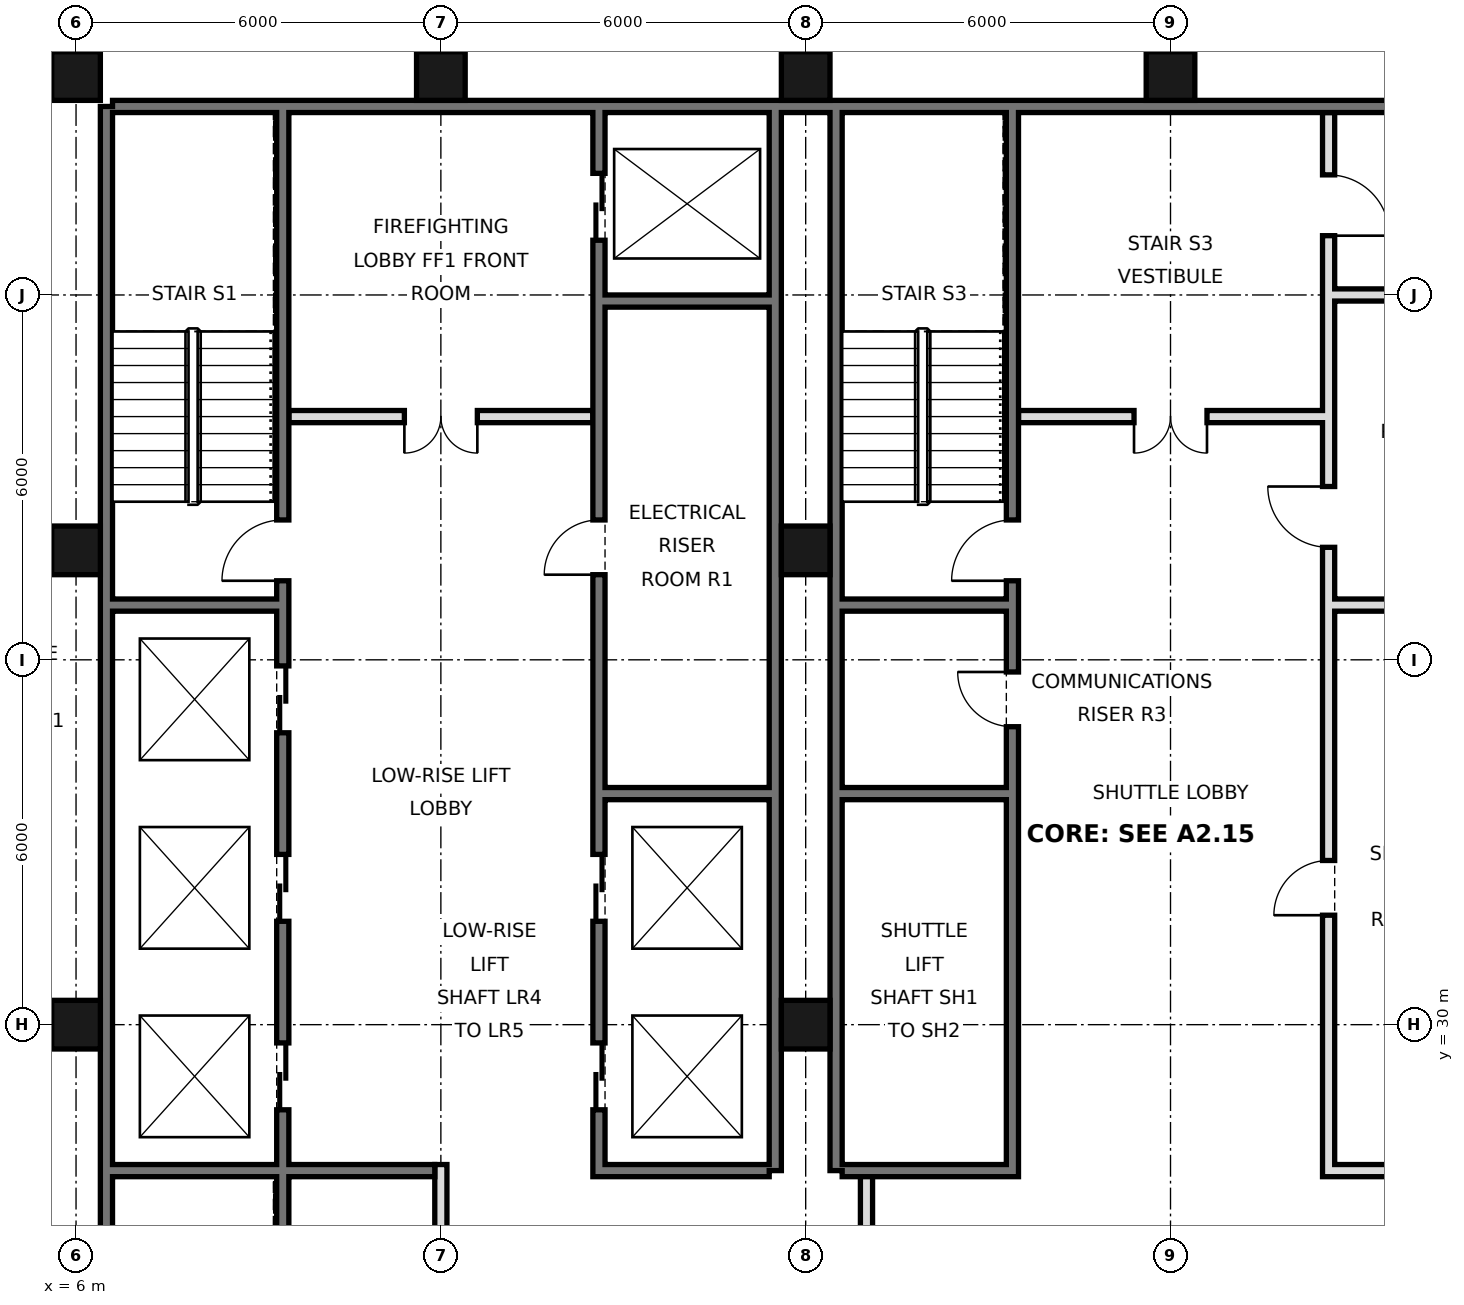
"""IFC4 building model, lengths in metres.
Left out: names, types, materials, properties, quantities, classifications, styles, units other than length and angle.
Written with IfcOpenShell. Run it as: python <this file> out.ifc"""

import sys

from ifc_helpers import new_model, si_unit, direction, frame, frame_2d, origin, origin_2d, place, context, subcontext, project, spatial, rectangle, hollow_rectangle, extrude, element, fill, save


model = new_model("IFC4")
c1 = context("Model", 3, precision=1e-05, world=origin(), true_north=direction((0.0, 1.0)))
c2 = subcontext(c1, "Body", "Model", "MODEL_VIEW")
j1 = project(units=[si_unit("LENGTHUNIT", "METRE"), si_unit("PLANEANGLEUNIT", "RADIAN")], contexts=[c1])
p1 = place(None, origin())
s1 = spatial("IfcSite", under=j1, at=p1, CompositionType="ELEMENT")
p2 = place(p1, origin())
s2 = spatial("IfcBuilding", under=s1, at=p2, CompositionType="ELEMENT")
p3 = place(p2, frame((0.0, 0.0, 60.6)))
s3 = spatial("IfcBuildingStorey", under=s2, at=p3, CompositionType="ELEMENT", Elevation=60.6)
for number, where, z_axis, x_axis in (
    (1, (6.0, 30.0, 0.0), (0.0, 0.0, 1.0), (1.0, 0.0, 0.0)),
    (2, (6.0, 37.8, 0.0), (0.0, 0.0, 1.0), (1.0, 0.0, 0.0)),
    (3, (6.0, 45.6, 0.0), (0.0, 0.0, 1.0), (1.0, 0.0, 0.0)),
    (4, (12.0, 45.6, 0.0), (0.0, 0.0, 1.0), (1.0, 0.0, 0.0)),
    (5, (18.0, 30.0, 0.0), (0.0, 0.0, 1.0), (1.0, 0.0, 0.0)),
    (6, (18.0, 37.8, 0.0), (0.0, 0.0, 1.0), (1.0, 0.0, 0.0)),
    (7, (18.0, 45.6, 0.0), (0.0, 0.0, 1.0), (1.0, 0.0, 0.0)),
    (8, (24.0, 45.6, 0.0), (0.0, 0.0, 1.0), (1.0, 0.0, 0.0)),
):
    element("IfcColumn", number, at=place(p3, frame(where, z_axis=z_axis, x_axis=x_axis)), inside=s3, PredefinedType="COLUMN", context=c2, shape_type="SweptSolid", body=[
        extrude(hollow_rectangle(XDim=0.8, YDim=0.8, WallThickness=0.06, at=origin_2d()), origin(), (0.0, 0.0, 1.0), 3.6),
    ])
p4 = place(p3, frame((6.5, 21.6, 0.0), z_axis=(0.0, 0.0, 1.0), x_axis=(0.0, 1.0, 0.0)))
e9 = element("IfcWall", 9, at=p4, inside=s3, PredefinedType="SOLIDWALL", context=c2, shape_type="SweptSolid", body=[
    extrude(rectangle(XDim=23.5, YDim=0.2, at=frame_2d((11.75, 0.0))), origin(), (0.0, 0.0, 1.0), 3.42),
])
p5 = place(p3, frame((6.6, 45.1, 0.0), z_axis=(0.0, 0.0, 1.0), x_axis=(1.0, 0.0, 0.0)))
e10 = element("IfcWall", 10, at=p5, inside=s3, PredefinedType="SOLIDWALL", context=c2, shape_type="SweptSolid", body=[
    extrude(rectangle(XDim=34.8, YDim=0.2, at=frame_2d((17.4, 0.0))), origin(), (0.0, 0.0, 1.0), 3.42),
])
for number, where, z_axis, x_axis in (
    (11, (17.5, 27.6, 0.0), (0.0, 0.0, 1.0), (0.0, 1.0, 0.0)),
    (12, (18.5, 27.6, 0.0), (0.0, 0.0, 1.0), (0.0, 1.0, 0.0)),
):
    element("IfcWall", number, at=place(p3, frame(where, z_axis=z_axis, x_axis=x_axis)), inside=s3, PredefinedType="SOLIDWALL", context=c2, shape_type="SweptSolid", body=[
        extrude(rectangle(XDim=17.5, YDim=0.2, at=frame_2d((8.75, 0.0))), origin(), (0.0, 0.0, 1.0), 3.42),
    ])
p6 = place(p3, frame((19.0, 21.6, 0.0), z_axis=(0.0, 0.0, 1.0), x_axis=(0.0, 1.0, 0.0)))
e13 = element("IfcWall", 13, at=p6, inside=s3, PredefinedType="PARTITIONING", context=c2, shape_type="SweptSolid", body=[
    extrude(rectangle(XDim=6.0, YDim=0.2, at=frame_2d((3.0, 0.0))), origin(), (0.0, 0.0, 1.0), 3.42),
])
p7 = place(p6, frame((2.1, 0.0, 0.0)))
e14 = element("IfcOpeningElement", 14, at=p7, cuts=e13, PredefinedType="OPENING", context=c2, shape_type="SweptSolid", body=[
    extrude(rectangle(XDim=1.8, YDim=2.1, at=frame_2d((0.9, 1.05))), frame((0.0, 0.11, 0.0), z_axis=(0.0, -1.0, 0.0), x_axis=(1.0, 0.0, 0.0)), (0.0, 0.0, 1.0), 0.22),
])
p8 = place(p3, frame((12.0, 21.6, 0.0), z_axis=(0.0, 0.0, 1.0), x_axis=(0.0, 1.0, 0.0)))
e15 = element("IfcWall", 15, at=p8, inside=s3, PredefinedType="PARTITIONING", context=c2, shape_type="SweptSolid", body=[
    extrude(rectangle(XDim=6.1, YDim=0.2, at=frame_2d((3.05, 0.0))), origin(), (0.0, 0.0, 1.0), 3.42),
])
p9 = place(p3, frame((14.6, 27.5, 0.0), z_axis=(0.0, 0.0, 1.0), x_axis=(0.0, 1.0, 0.0)))
e16 = element("IfcWall", 16, at=p9, inside=s3, PredefinedType="SOLIDWALL", context=c2, shape_type="SweptSolid", body=[
    extrude(rectangle(XDim=17.5, YDim=0.2, at=frame_2d((8.75, 0.0))), origin(), (0.0, 0.0, 1.0), 3.42),
])
p10 = place(p9, frame((1.1, 0.0, 0.0)))
e17 = element("IfcOpeningElement", 17, at=p10, cuts=e16, PredefinedType="OPENING", context=c2, shape_type="SweptSolid", body=[
    extrude(rectangle(XDim=1.1, YDim=2.1, at=frame_2d((0.55, 1.05))), frame((0.0, 0.11, 0.0), z_axis=(0.0, -1.0, 0.0), x_axis=(1.0, 0.0, 0.0)), (0.0, 0.0, 1.0), 0.22),
])
p11 = place(p9, frame((4.2, 0.0, 0.0)))
e18 = element("IfcOpeningElement", 18, at=p11, cuts=e16, PredefinedType="OPENING", context=c2, shape_type="SweptSolid", body=[
    extrude(rectangle(XDim=1.1, YDim=2.1, at=frame_2d((0.55, 1.05))), frame((0.0, 0.11, 0.0), z_axis=(0.0, -1.0, 0.0), x_axis=(1.0, 0.0, 0.0)), (0.0, 0.0, 1.0), 0.22),
])
p12 = place(p9, frame((15.4, 0.0, 0.0)))
e19 = element("IfcOpeningElement", 19, at=p12, cuts=e16, PredefinedType="OPENING", context=c2, shape_type="SweptSolid", body=[
    extrude(rectangle(XDim=1.1, YDim=2.1, at=frame_2d((0.55, 1.05))), frame((0.0, 0.11, 0.0), z_axis=(0.0, -1.0, 0.0), x_axis=(1.0, 0.0, 0.0)), (0.0, 0.0, 1.0), 0.22),
])
p13 = place(p9, frame((9.9, 0.0, 0.0)))
e20 = element("IfcOpeningElement", 20, at=p13, cuts=e16, PredefinedType="OPENING", context=c2, shape_type="SweptSolid", body=[
    extrude(rectangle(XDim=0.9, YDim=2.1, at=frame_2d((0.45, 1.05))), frame((0.0, 0.11, 0.0), z_axis=(0.0, -1.0, 0.0), x_axis=(1.0, 0.0, 0.0)), (0.0, 0.0, 1.0), 0.22),
])
p14 = place(p3, frame((21.4, 27.5, 0.0), z_axis=(0.0, 0.0, 1.0), x_axis=(0.0, 1.0, 0.0)))
e21 = element("IfcWall", 21, at=p14, inside=s3, PredefinedType="SOLIDWALL", context=c2, shape_type="SweptSolid", body=[
    extrude(rectangle(XDim=17.5, YDim=0.2, at=frame_2d((8.75, 0.0))), origin(), (0.0, 0.0, 1.0), 3.42),
])
p15 = place(p14, frame((9.8, 0.0, 0.0)))
e22 = element("IfcOpeningElement", 22, at=p15, cuts=e21, PredefinedType="OPENING", context=c2, shape_type="SweptSolid", body=[
    extrude(rectangle(XDim=1.0, YDim=2.1, at=frame_2d((0.5, 1.05))), frame((0.0, 0.11, 0.0), z_axis=(0.0, -1.0, 0.0), x_axis=(1.0, 0.0, 0.0)), (0.0, 0.0, 1.0), 0.22),
])
p16 = place(p14, frame((7.4, 0.0, 0.0)))
e23 = element("IfcOpeningElement", 23, at=p16, cuts=e21, PredefinedType="OPENING", context=c2, shape_type="SweptSolid", body=[
    extrude(rectangle(XDim=0.9, YDim=2.1, at=frame_2d((0.45, 1.05))), frame((0.0, 0.11, 0.0), z_axis=(0.0, -1.0, 0.0), x_axis=(1.0, 0.0, 0.0)), (0.0, 0.0, 1.0), 0.22),
])
p17 = place(p3, frame((26.6, 27.5, 0.0), z_axis=(0.0, 0.0, 1.0), x_axis=(0.0, 1.0, 0.0)))
e24 = element("IfcWall", 24, at=p17, inside=s3, PredefinedType="SOLIDWALL", context=c2, shape_type="SweptSolid", body=[
    extrude(rectangle(XDim=17.5, YDim=0.2, at=frame_2d((8.75, 0.0))), origin(), (0.0, 0.0, 1.0), 3.42),
])
p18 = place(p17, frame((4.3, 0.0, 0.0)))
e25 = element("IfcOpeningElement", 25, at=p18, cuts=e24, PredefinedType="OPENING", context=c2, shape_type="SweptSolid", body=[
    extrude(rectangle(XDim=0.9, YDim=2.1, at=frame_2d((0.45, 1.05))), frame((0.0, 0.11, 0.0), z_axis=(0.0, -1.0, 0.0), x_axis=(1.0, 0.0, 0.0)), (0.0, 0.0, 1.0), 0.22),
])
p19 = place(p17, frame((10.35, 0.0, 0.0)))
e26 = element("IfcOpeningElement", 26, at=p19, cuts=e24, PredefinedType="OPENING", context=c2, shape_type="SweptSolid", body=[
    extrude(rectangle(XDim=1.0, YDim=2.1, at=frame_2d((0.5, 1.05))), frame((0.0, 0.11, 0.0), z_axis=(0.0, -1.0, 0.0), x_axis=(1.0, 0.0, 0.0)), (0.0, 0.0, 1.0), 0.22),
])
p20 = place(p17, frame((15.475, 0.0, 0.0)))
e27 = element("IfcOpeningElement", 27, at=p20, cuts=e24, PredefinedType="OPENING", context=c2, shape_type="SweptSolid", body=[
    extrude(rectangle(XDim=1.0, YDim=2.1, at=frame_2d((0.5, 1.05))), frame((0.0, 0.11, 0.0), z_axis=(0.0, -1.0, 0.0), x_axis=(1.0, 0.0, 0.0)), (0.0, 0.0, 1.0), 0.22),
])
p21 = place(p3, frame((9.4, 21.6, 0.0), z_axis=(0.0, 0.0, 1.0), x_axis=(0.0, 1.0, 0.0)))
e28 = element("IfcWall", 28, at=p21, inside=s3, PredefinedType="SOLIDWALL", context=c2, shape_type="SweptSolid", body=[
    extrude(rectangle(XDim=23.4, YDim=0.2, at=frame_2d((11.7, 0.0))), origin(), (0.0, 0.0, 1.0), 3.42),
])
p22 = place(p21, frame((7.0, 0.0, 0.0)))
e29 = element("IfcOpeningElement", 29, at=p22, cuts=e28, PredefinedType="OPENING", context=c2, shape_type="SweptSolid", body=[
    extrude(rectangle(XDim=1.1, YDim=2.1, at=frame_2d((0.55, 1.05))), frame((0.0, 0.11, 0.0), z_axis=(0.0, -1.0, 0.0), x_axis=(1.0, 0.0, 0.0)), (0.0, 0.0, 1.0), 0.22),
])
p23 = place(p21, frame((10.1, 0.0, 0.0)))
e30 = element("IfcOpeningElement", 30, at=p23, cuts=e28, PredefinedType="OPENING", context=c2, shape_type="SweptSolid", body=[
    extrude(rectangle(XDim=1.1, YDim=2.1, at=frame_2d((0.55, 1.05))), frame((0.0, 0.11, 0.0), z_axis=(0.0, -1.0, 0.0), x_axis=(1.0, 0.0, 0.0)), (0.0, 0.0, 1.0), 0.22),
])
p24 = place(p21, frame((13.2, 0.0, 0.0)))
e31 = element("IfcOpeningElement", 31, at=p24, cuts=e28, PredefinedType="OPENING", context=c2, shape_type="SweptSolid", body=[
    extrude(rectangle(XDim=1.1, YDim=2.1, at=frame_2d((0.55, 1.05))), frame((0.0, 0.11, 0.0), z_axis=(0.0, -1.0, 0.0), x_axis=(1.0, 0.0, 0.0)), (0.0, 0.0, 1.0), 0.22),
])
p25 = place(p21, frame((15.7, 0.0, 0.0)))
e32 = element("IfcOpeningElement", 32, at=p25, cuts=e28, PredefinedType="OPENING", context=c2, shape_type="SweptSolid", body=[
    extrude(rectangle(XDim=1.0, YDim=2.1, at=frame_2d((0.5, 1.05))), frame((0.0, 0.11, 0.0), z_axis=(0.0, -1.0, 0.0), x_axis=(1.0, 0.0, 0.0)), (0.0, 0.0, 1.0), 0.22),
])
p26 = place(p21, frame((0.175, 0.0, 0.0)))
e33 = element("IfcOpeningElement", 33, at=p26, cuts=e28, PredefinedType="OPENING", context=c2, shape_type="SweptSolid", body=[
    extrude(rectangle(XDim=0.9, YDim=2.1, at=frame_2d((0.45, 1.05))), frame((0.0, 0.11, 0.0), z_axis=(0.0, -1.0, 0.0), x_axis=(1.0, 0.0, 0.0)), (0.0, 0.0, 1.0), 0.22),
])
for number, where, z_axis, x_axis in (
    (34, (14.7, 27.6, 0.0), (0.0, 0.0, 1.0), (1.0, 0.0, 0.0)),
    (35, (18.6, 27.6, 0.0), (0.0, 0.0, 1.0), (1.0, 0.0, 0.0)),
    (36, (26.7, 27.6, 0.0), (0.0, 0.0, 1.0), (1.0, 0.0, 0.0)),
):
    element("IfcWall", number, at=place(p3, frame(where, z_axis=z_axis, x_axis=x_axis)), inside=s3, PredefinedType="SOLIDWALL", context=c2, shape_type="SweptSolid", body=[
        extrude(rectangle(XDim=2.7, YDim=0.2, at=frame_2d((1.35, 0.0))), origin(), (0.0, 0.0, 1.0), 3.42),
    ])
p27 = place(p3, frame((6.6, 27.6, 0.0), z_axis=(0.0, 0.0, 1.0), x_axis=(1.0, 0.0, 0.0)))
e37 = element("IfcWall", 37, at=p27, inside=s3, PredefinedType="SOLIDWALL", context=c2, shape_type="SweptSolid", body=[
    extrude(rectangle(XDim=5.3, YDim=0.2, at=frame_2d((2.65, 0.0))), origin(), (0.0, 0.0, 1.0), 3.42),
])
for number, where, z_axis, x_axis in (
    (38, (14.7, 33.8, 0.0), (0.0, 0.0, 1.0), (1.0, 0.0, 0.0)),
    (39, (18.6, 33.8, 0.0), (0.0, 0.0, 1.0), (1.0, 0.0, 0.0)),
    (40, (18.6, 36.9, 0.0), (0.0, 0.0, 1.0), (1.0, 0.0, 0.0)),
    (41, (26.7, 36.9, 0.0), (0.0, 0.0, 1.0), (1.0, 0.0, 0.0)),
    (42, (6.6, 36.9, 0.0), (0.0, 0.0, 1.0), (1.0, 0.0, 0.0)),
):
    element("IfcWall", number, at=place(p3, frame(where, z_axis=z_axis, x_axis=x_axis)), inside=s3, PredefinedType="SOLIDWALL", context=c2, shape_type="SweptSolid", body=[
        extrude(rectangle(XDim=2.7, YDim=0.2, at=frame_2d((1.35, 0.0))), origin(), (0.0, 0.0, 1.0), 3.42),
    ])
p28 = place(p3, frame((21.5, 40.0, 0.0), z_axis=(0.0, 0.0, 1.0), x_axis=(1.0, 0.0, 0.0)))
e43 = element("IfcWall", 43, at=p28, inside=s3, PredefinedType="PARTITIONING", context=c2, shape_type="SweptSolid", body=[
    extrude(rectangle(XDim=5.0, YDim=0.2, at=frame_2d((2.5, 0.0))), origin(), (0.0, 0.0, 1.0), 3.42),
])
p29 = place(p28, frame((1.9, 0.0, 0.0)))
e44 = element("IfcOpeningElement", 44, at=p29, cuts=e43, PredefinedType="OPENING", context=c2, shape_type="SweptSolid", body=[
    extrude(rectangle(XDim=1.2, YDim=2.1, at=frame_2d((0.6, 1.05))), frame((0.0, 0.11, 0.0), z_axis=(0.0, -1.0, 0.0), x_axis=(1.0, 0.0, 0.0)), (0.0, 0.0, 1.0), 0.22),
])
p30 = place(p3, frame((9.5, 40.0, 0.0), z_axis=(0.0, 0.0, 1.0), x_axis=(1.0, 0.0, 0.0)))
e45 = element("IfcWall", 45, at=p30, inside=s3, PredefinedType="PARTITIONING", context=c2, shape_type="SweptSolid", body=[
    extrude(rectangle(XDim=5.0, YDim=0.2, at=frame_2d((2.5, 0.0))), origin(), (0.0, 0.0, 1.0), 3.42),
])
p31 = place(p30, frame((1.9, 0.0, 0.0)))
e46 = element("IfcOpeningElement", 46, at=p31, cuts=e45, PredefinedType="OPENING", context=c2, shape_type="SweptSolid", body=[
    extrude(rectangle(XDim=1.2, YDim=2.1, at=frame_2d((0.6, 1.05))), frame((0.0, 0.11, 0.0), z_axis=(0.0, -1.0, 0.0), x_axis=(1.0, 0.0, 0.0)), (0.0, 0.0, 1.0), 0.22),
])
p32 = place(p3, frame((14.7, 41.9, 0.0), z_axis=(0.0, 0.0, 1.0), x_axis=(1.0, 0.0, 0.0)))
e47 = element("IfcWall", 47, at=p32, inside=s3, PredefinedType="SOLIDWALL", context=c2, shape_type="SweptSolid", body=[
    extrude(rectangle(XDim=2.7, YDim=0.2, at=frame_2d((1.35, 0.0))), origin(), (0.0, 0.0, 1.0), 3.42),
])
p33 = place(p3, frame((26.7, 42.0, 0.0), z_axis=(0.0, 0.0, 1.0), x_axis=(1.0, 0.0, 0.0)))
e48 = element("IfcWall", 48, at=p33, inside=s3, PredefinedType="PARTITIONING", context=c2, shape_type="SweptSolid", body=[
    extrude(rectangle(XDim=2.7, YDim=0.2, at=frame_2d((1.35, 0.0))), origin(), (0.0, 0.0, 1.0), 3.42),
])
p34 = place(p31, frame((1.2, 0.0, 0.0), z_axis=(0.0, 0.0, 1.0), x_axis=(-1.0, 0.0, 0.0)))
e49 = element("IfcDoor", 49, at=p34, inside=s3, OperationType="DOUBLE_DOOR_SINGLE_SWING", PredefinedType="DOOR", context=c2, shape_type="SweptSolid", body=[
    extrude(rectangle(XDim=1.2, YDim=2.1, at=frame_2d((0.6, 1.05))), frame((0.0, 0.025, 0.0), z_axis=(0.0, -1.0, 0.0), x_axis=(1.0, 0.0, 0.0)), (0.0, 0.0, 1.0), 0.05),
])
fill(e46, e49)
p35 = place(p29, frame((1.2, 0.0, 0.0), z_axis=(0.0, 0.0, 1.0), x_axis=(-1.0, 0.0, 0.0)))
e50 = element("IfcDoor", 50, at=p35, inside=s3, OperationType="DOUBLE_DOOR_SINGLE_SWING", PredefinedType="DOOR", context=c2, shape_type="SweptSolid", body=[
    extrude(rectangle(XDim=1.2, YDim=2.1, at=frame_2d((0.6, 1.05))), frame((0.0, 0.025, 0.0), z_axis=(0.0, -1.0, 0.0), x_axis=(1.0, 0.0, 0.0)), (0.0, 0.0, 1.0), 0.05),
])
fill(e44, e50)
p36 = place(p10, origin())
e51 = element("IfcDoor", 51, at=p36, inside=s3, OperationType="DOUBLE_DOOR_SLIDING", PredefinedType="DOOR", context=c2, shape_type="SweptSolid", body=[
    extrude(rectangle(XDim=1.1, YDim=2.1, at=frame_2d((0.55, 1.05))), frame((0.0, 0.025, 0.0), z_axis=(0.0, -1.0, 0.0), x_axis=(1.0, 0.0, 0.0)), (0.0, 0.0, 1.0), 0.05),
])
fill(e17, e51)
p37 = place(p11, origin())
e52 = element("IfcDoor", 52, at=p37, inside=s3, OperationType="DOUBLE_DOOR_SLIDING", PredefinedType="DOOR", context=c2, shape_type="SweptSolid", body=[
    extrude(rectangle(XDim=1.1, YDim=2.1, at=frame_2d((0.55, 1.05))), frame((0.0, 0.025, 0.0), z_axis=(0.0, -1.0, 0.0), x_axis=(1.0, 0.0, 0.0)), (0.0, 0.0, 1.0), 0.05),
])
fill(e18, e52)
p38 = place(p12, origin())
e53 = element("IfcDoor", 53, at=p38, inside=s3, OperationType="DOUBLE_DOOR_SLIDING", PredefinedType="DOOR", context=c2, shape_type="SweptSolid", body=[
    extrude(rectangle(XDim=1.1, YDim=2.1, at=frame_2d((0.55, 1.05))), frame((0.0, 0.025, 0.0), z_axis=(0.0, -1.0, 0.0), x_axis=(1.0, 0.0, 0.0)), (0.0, 0.0, 1.0), 0.05),
])
fill(e19, e53)
p39 = place(p22, origin())
e54 = element("IfcDoor", 54, at=p39, inside=s3, OperationType="DOUBLE_DOOR_SLIDING", PredefinedType="DOOR", context=c2, shape_type="SweptSolid", body=[
    extrude(rectangle(XDim=1.1, YDim=2.1, at=frame_2d((0.55, 1.05))), frame((0.0, 0.025, 0.0), z_axis=(0.0, -1.0, 0.0), x_axis=(1.0, 0.0, 0.0)), (0.0, 0.0, 1.0), 0.05),
])
fill(e29, e54)
p40 = place(p23, origin())
e55 = element("IfcDoor", 55, at=p40, inside=s3, OperationType="DOUBLE_DOOR_SLIDING", PredefinedType="DOOR", context=c2, shape_type="SweptSolid", body=[
    extrude(rectangle(XDim=1.1, YDim=2.1, at=frame_2d((0.55, 1.05))), frame((0.0, 0.025, 0.0), z_axis=(0.0, -1.0, 0.0), x_axis=(1.0, 0.0, 0.0)), (0.0, 0.0, 1.0), 0.05),
])
fill(e30, e55)
p41 = place(p24, origin())
e56 = element("IfcDoor", 56, at=p41, inside=s3, OperationType="DOUBLE_DOOR_SLIDING", PredefinedType="DOOR", context=c2, shape_type="SweptSolid", body=[
    extrude(rectangle(XDim=1.1, YDim=2.1, at=frame_2d((0.55, 1.05))), frame((0.0, 0.025, 0.0), z_axis=(0.0, -1.0, 0.0), x_axis=(1.0, 0.0, 0.0)), (0.0, 0.0, 1.0), 0.05),
])
fill(e31, e56)
p42 = place(p25, origin())
e57 = element("IfcDoor", 57, at=p42, inside=s3, OperationType="SINGLE_SWING_LEFT", PredefinedType="DOOR", context=c2, shape_type="SweptSolid", body=[
    extrude(rectangle(XDim=1.0, YDim=2.1, at=frame_2d((0.5, 1.05))), frame((0.0, 0.025, 0.0), z_axis=(0.0, -1.0, 0.0), x_axis=(1.0, 0.0, 0.0)), (0.0, 0.0, 1.0), 0.05),
])
fill(e32, e57)
p43 = place(p15, origin())
e58 = element("IfcDoor", 58, at=p43, inside=s3, OperationType="SINGLE_SWING_LEFT", PredefinedType="DOOR", context=c2, shape_type="SweptSolid", body=[
    extrude(rectangle(XDim=1.0, YDim=2.1, at=frame_2d((0.5, 1.05))), frame((0.0, 0.025, 0.0), z_axis=(0.0, -1.0, 0.0), x_axis=(1.0, 0.0, 0.0)), (0.0, 0.0, 1.0), 0.05),
])
fill(e22, e58)
p44 = place(p13, origin())
e59 = element("IfcDoor", 59, at=p44, inside=s3, OperationType="SINGLE_SWING_LEFT", PredefinedType="DOOR", context=c2, shape_type="SweptSolid", body=[
    extrude(rectangle(XDim=0.9, YDim=2.1, at=frame_2d((0.45, 1.05))), frame((0.0, 0.025, 0.0), z_axis=(0.0, -1.0, 0.0), x_axis=(1.0, 0.0, 0.0)), (0.0, 0.0, 1.0), 0.05),
])
fill(e20, e59)
p45 = place(p16, frame((0.9, 0.0, 0.0), z_axis=(0.0, 0.0, 1.0), x_axis=(-1.0, 0.0, 0.0)))
e60 = element("IfcDoor", 60, at=p45, inside=s3, OperationType="SINGLE_SWING_LEFT", PredefinedType="DOOR", context=c2, shape_type="SweptSolid", body=[
    extrude(rectangle(XDim=0.9, YDim=2.1, at=frame_2d((0.45, 1.05))), frame((0.0, 0.025, 0.0), z_axis=(0.0, -1.0, 0.0), x_axis=(1.0, 0.0, 0.0)), (0.0, 0.0, 1.0), 0.05),
])
fill(e23, e60)
p46 = place(p18, origin())
e61 = element("IfcDoor", 61, at=p46, inside=s3, OperationType="SINGLE_SWING_LEFT", PredefinedType="DOOR", context=c2, shape_type="SweptSolid", body=[
    extrude(rectangle(XDim=0.9, YDim=2.1, at=frame_2d((0.45, 1.05))), frame((0.0, 0.025, 0.0), z_axis=(0.0, -1.0, 0.0), x_axis=(1.0, 0.0, 0.0)), (0.0, 0.0, 1.0), 0.05),
])
fill(e25, e61)
p47 = place(p19, frame((1.0, 0.0, 0.0), z_axis=(0.0, 0.0, 1.0), x_axis=(-1.0, 0.0, 0.0)))
e62 = element("IfcDoor", 62, at=p47, inside=s3, OperationType="SINGLE_SWING_LEFT", PredefinedType="DOOR", context=c2, shape_type="SweptSolid", body=[
    extrude(rectangle(XDim=1.0, YDim=2.1, at=frame_2d((0.5, 1.05))), frame((0.0, 0.025, 0.0), z_axis=(0.0, -1.0, 0.0), x_axis=(1.0, 0.0, 0.0)), (0.0, 0.0, 1.0), 0.05),
])
fill(e26, e62)
p48 = place(p20, frame((1.0, 0.0, 0.0), z_axis=(0.0, 0.0, 1.0), x_axis=(-1.0, 0.0, 0.0)))
e63 = element("IfcDoor", 63, at=p48, inside=s3, OperationType="SINGLE_SWING_RIGHT", PredefinedType="DOOR", context=c2, shape_type="SweptSolid", body=[
    extrude(rectangle(XDim=1.0, YDim=2.1, at=frame_2d((0.5, 1.05))), frame((0.0, 0.025, 0.0), z_axis=(0.0, -1.0, 0.0), x_axis=(1.0, 0.0, 0.0)), (0.0, 0.0, 1.0), 0.05),
])
fill(e27, e63)
save(model, sys.argv[1])
